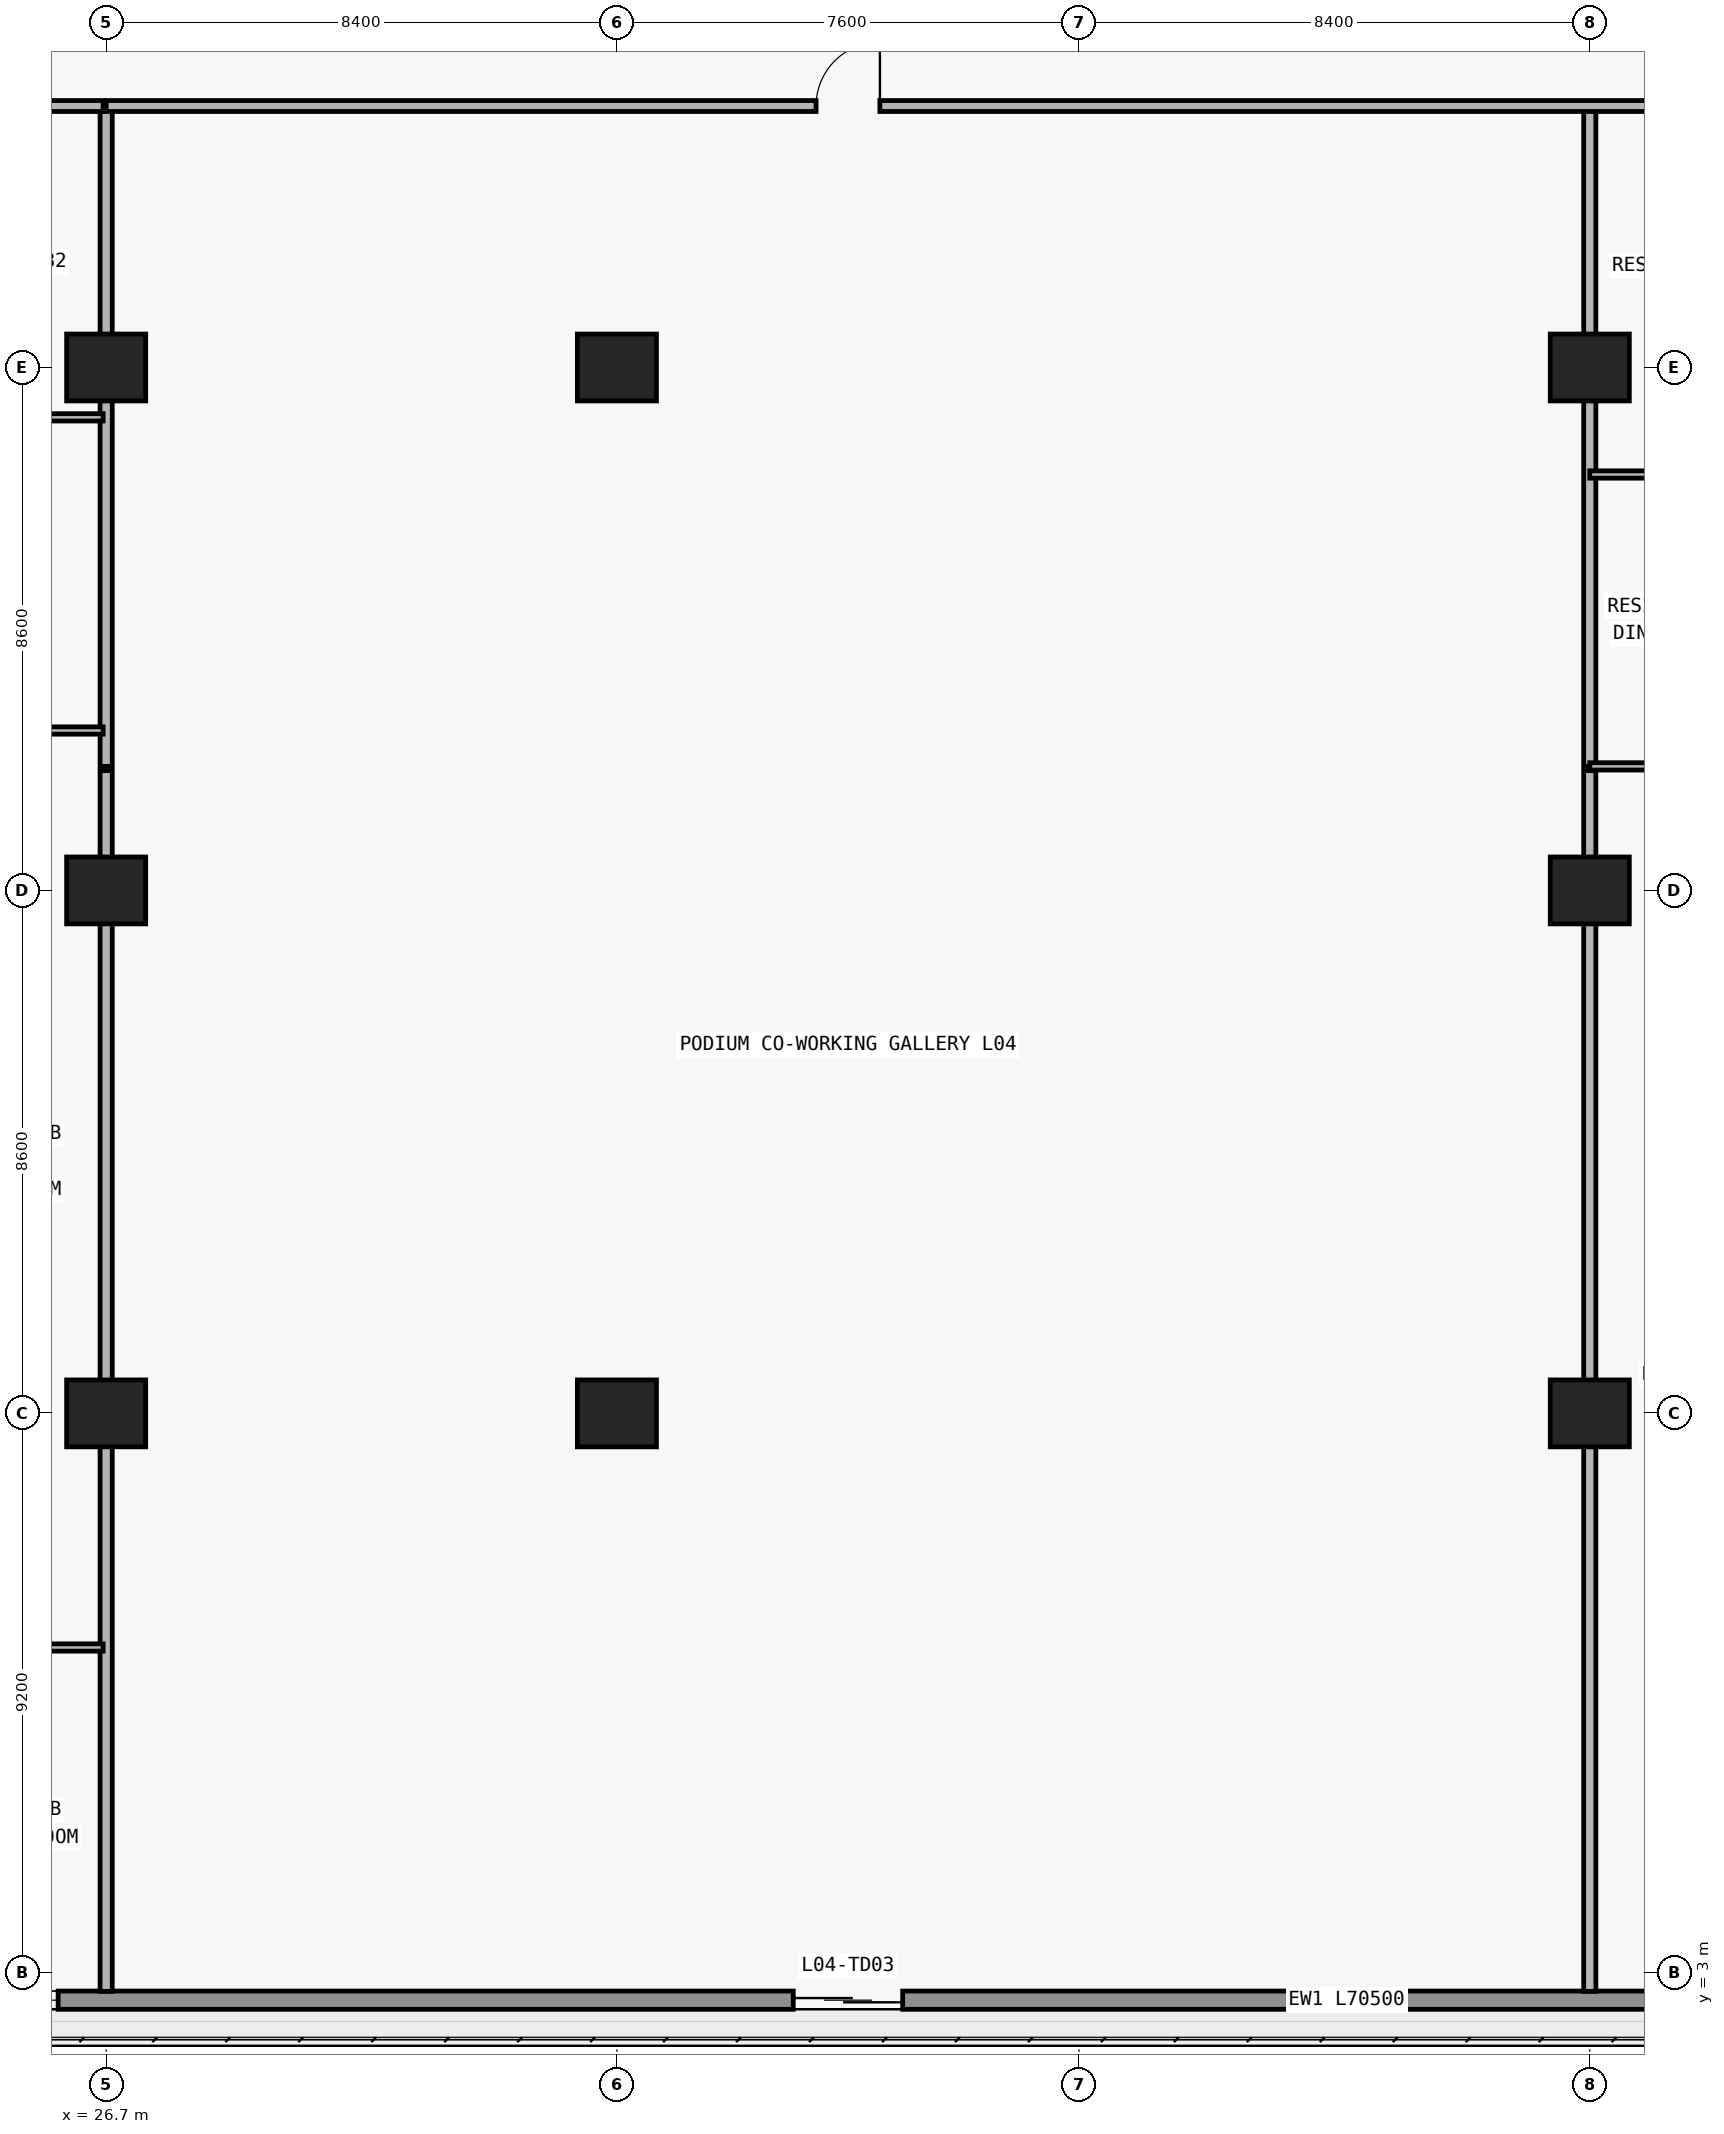
"""IFC4 building model, lengths in metres.
Left out: names, types, materials, properties, quantities, classifications, styles, units other than length and angle.
Written with IfcOpenShell. Run it as: python <this file> out.ifc"""

import sys

from ifc_helpers import new_model, si_unit, direction, frame, frame_2d, origin, origin_2d, place, context, subcontext, project, spatial, rectangle, extrude, element, fill, save


model = new_model("IFC4")
c1 = context("Model", 3, precision=1e-05, world=origin(), true_north=direction((0.0, 1.0)))
c2 = subcontext(c1, "Body", "Model", "MODEL_VIEW")
j1 = project(units=[si_unit("LENGTHUNIT", "METRE"), si_unit("PLANEANGLEUNIT", "RADIAN")], contexts=[c1])
p1 = place(None, origin())
s1 = spatial("IfcSite", under=j1, at=p1, CompositionType="ELEMENT")
p2 = place(p1, origin())
s2 = spatial("IfcBuilding", under=s1, at=p2, CompositionType="ELEMENT")
p3 = place(p2, frame((0.0, 0.0, 19.8)))
s3 = spatial("IfcBuildingStorey", under=s2, at=p3, CompositionType="ELEMENT", Elevation=19.8)
for number, where, z_axis, x_axis in (
    (1, (26.7, 12.2, 0.0), (0.0, 0.0, 1.0), (1.0, 0.0, 0.0)),
    (2, (35.1, 12.2, 0.0), (0.0, 0.0, 1.0), (1.0, 0.0, 0.0)),
    (3, (51.1, 12.2, 0.0), (0.0, 0.0, 1.0), (1.0, 0.0, 0.0)),
    (4, (26.7, 20.8, 0.0), (0.0, 0.0, 1.0), (1.0, 0.0, 0.0)),
    (5, (51.1, 20.8, 0.0), (0.0, 0.0, 1.0), (1.0, 0.0, 0.0)),
    (6, (26.7, 29.4, 0.0), (0.0, 0.0, 1.0), (1.0, 0.0, 0.0)),
    (7, (35.1, 29.4, 0.0), (0.0, 0.0, 1.0), (1.0, 0.0, 0.0)),
    (8, (51.1, 29.4, 0.0), (0.0, 0.0, 1.0), (1.0, 0.0, 0.0)),
):
    element("IfcColumn", number, at=place(p3, frame(where, z_axis=z_axis, x_axis=x_axis)), inside=s3, PredefinedType="COLUMN", context=c2, shape_type="SweptSolid", body=[
        extrude(rectangle(XDim=1.3, YDim=1.1, at=origin_2d()), origin(), (0.0, 0.0, 1.0), 4.45),
    ])
p4 = place(p3, frame((74.15, 2.55, 0.0), z_axis=(0.0, 0.0, 1.0), x_axis=(-1.0, 0.0, 0.0)))
e9 = element("IfcWall", 9, at=p4, inside=s3, PredefinedType="STANDARD", context=c2, shape_type="SweptSolid", body=[
    extrude(rectangle(XDim=70.5, YDim=0.3, at=frame_2d((35.25, 0.0))), origin(), (0.0, 0.0, 1.0), 4.45),
])
p5 = place(p4, frame((65.875, 0.0, 0.85)))
e10 = element("IfcOpeningElement", 10, at=p5, cuts=e9, PredefinedType="OPENING", context=c2, shape_type="SweptSolid", body=[
    extrude(rectangle(XDim=3.0, YDim=2.4, at=frame_2d((1.5, 1.2))), frame((0.0, 0.16, 0.0), z_axis=(0.0, -1.0, 0.0), x_axis=(1.0, 0.0, 0.0)), (0.0, 0.0, 1.0), 0.32),
])
p6 = place(p4, frame((61.376, 0.0, 0.0)))
e11 = element("IfcOpeningElement", 11, at=p6, cuts=e9, PredefinedType="OPENING", context=c2, shape_type="SweptSolid", body=[
    extrude(rectangle(XDim=1.8, YDim=2.3, at=frame_2d((0.9, 1.15))), frame((0.0, 0.16, 0.0), z_axis=(0.0, -1.0, 0.0), x_axis=(1.0, 0.0, 0.0)), (0.0, 0.0, 1.0), 0.32),
])
p7 = place(p4, frame((56.976, 0.0, 0.85)))
e12 = element("IfcOpeningElement", 12, at=p7, cuts=e9, PredefinedType="OPENING", context=c2, shape_type="SweptSolid", body=[
    extrude(rectangle(XDim=2.2, YDim=1.55, at=frame_2d((1.1, 0.775))), frame((0.0, 0.16, 0.0), z_axis=(0.0, -1.0, 0.0), x_axis=(1.0, 0.0, 0.0)), (0.0, 0.0, 1.0), 0.32),
])
p8 = place(p4, frame((52.64, 0.0, 0.0)))
e13 = element("IfcOpeningElement", 13, at=p8, cuts=e9, PredefinedType="OPENING", context=c2, shape_type="SweptSolid", body=[
    extrude(rectangle(XDim=1.8, YDim=2.3, at=frame_2d((0.9, 1.15))), frame((0.0, 0.16, 0.0), z_axis=(0.0, -1.0, 0.0), x_axis=(1.0, 0.0, 0.0)), (0.0, 0.0, 1.0), 0.32),
])
p9 = place(p4, frame((48.24, 0.0, 0.85)))
e14 = element("IfcOpeningElement", 14, at=p9, cuts=e9, PredefinedType="OPENING", context=c2, shape_type="SweptSolid", body=[
    extrude(rectangle(XDim=2.2, YDim=1.55, at=frame_2d((1.1, 0.775))), frame((0.0, 0.16, 0.0), z_axis=(0.0, -1.0, 0.0), x_axis=(1.0, 0.0, 0.0)), (0.0, 0.0, 1.0), 0.32),
])
p10 = place(p4, frame((34.35, 0.0, 0.0)))
e15 = element("IfcOpeningElement", 15, at=p10, cuts=e9, PredefinedType="OPENING", context=c2, shape_type="SweptSolid", body=[
    extrude(rectangle(XDim=1.8, YDim=2.3, at=frame_2d((0.9, 1.15))), frame((0.0, 0.16, 0.0), z_axis=(0.0, -1.0, 0.0), x_axis=(1.0, 0.0, 0.0)), (0.0, 0.0, 1.0), 0.32),
])
p11 = place(p4, frame((17.95, 0.0, 0.0)))
e16 = element("IfcOpeningElement", 16, at=p11, cuts=e9, PredefinedType="OPENING", context=c2, shape_type="SweptSolid", body=[
    extrude(rectangle(XDim=1.8, YDim=2.3, at=frame_2d((0.9, 1.15))), frame((0.0, 0.16, 0.0), z_axis=(0.0, -1.0, 0.0), x_axis=(1.0, 0.0, 0.0)), (0.0, 0.0, 1.0), 0.32),
])
p12 = place(p4, frame((9.35, 0.0, 0.85)))
e17 = element("IfcOpeningElement", 17, at=p12, cuts=e9, PredefinedType="OPENING", context=c2, shape_type="SweptSolid", body=[
    extrude(rectangle(XDim=2.2, YDim=1.55, at=frame_2d((1.1, 0.775))), frame((0.0, 0.16, 0.0), z_axis=(0.0, -1.0, 0.0), x_axis=(1.0, 0.0, 0.0)), (0.0, 0.0, 1.0), 0.32),
])
p13 = place(p4, frame((1.625, 0.0, 0.85)))
e18 = element("IfcOpeningElement", 18, at=p13, cuts=e9, PredefinedType="OPENING", context=c2, shape_type="SweptSolid", body=[
    extrude(rectangle(XDim=3.0, YDim=2.4, at=frame_2d((1.5, 1.2))), frame((0.0, 0.16, 0.0), z_axis=(0.0, -1.0, 0.0), x_axis=(1.0, 0.0, 0.0)), (0.0, 0.0, 1.0), 0.32),
])
p14 = place(p3, frame((26.7, 2.695, 0.0), z_axis=(0.0, 0.0, 1.0), x_axis=(0.0, 1.0, 0.0)))
e19 = element("IfcWall", 19, at=p14, inside=s3, PredefinedType="PARTITIONING", context=c2, shape_type="SweptSolid", body=[
    extrude(rectangle(XDim=20.075, YDim=0.2, at=frame_2d((10.038, 0.0))), origin(), (0.0, 0.0, 1.0), 3.014),
])
p15 = place(p3, frame((26.7, 22.84, 0.0), z_axis=(0.0, 0.0, 1.0), x_axis=(0.0, 1.0, 0.0)))
e20 = element("IfcWall", 20, at=p15, inside=s3, PredefinedType="PARTITIONING", context=c2, shape_type="SweptSolid", body=[
    extrude(rectangle(XDim=10.86, YDim=0.2, at=frame_2d((5.43, 0.0))), origin(), (0.0, 0.0, 1.0), 3.414),
])
p16 = place(p3, frame((51.1, 2.695, 0.0), z_axis=(0.0, 0.0, 1.0), x_axis=(0.0, 1.0, 0.0)))
e21 = element("IfcWall", 21, at=p16, inside=s3, PredefinedType="PARTITIONING", context=c2, shape_type="SweptSolid", body=[
    extrude(rectangle(XDim=20.075, YDim=0.2, at=frame_2d((10.038, 0.0))), origin(), (0.0, 0.0, 1.0), 3.414),
])
p17 = place(p3, frame((51.1, 22.84, 0.0), z_axis=(0.0, 0.0, 1.0), x_axis=(0.0, 1.0, 0.0)))
e22 = element("IfcWall", 22, at=p17, inside=s3, PredefinedType="PARTITIONING", context=c2, shape_type="SweptSolid", body=[
    extrude(rectangle(XDim=10.86, YDim=0.2, at=frame_2d((5.43, 0.0))), origin(), (0.0, 0.0, 1.0), 3.414),
])
p18 = place(p3, frame((22.92, 8.35, 0.0), z_axis=(0.0, 0.0, 1.0), x_axis=(1.0, 0.0, 0.0)))
e23 = element("IfcWall", 23, at=p18, inside=s3, PredefinedType="PARTITIONING", context=c2, shape_type="SweptSolid", body=[
    extrude(rectangle(XDim=3.73, YDim=0.12, at=frame_2d((1.865, 0.0))), origin(), (0.0, 0.0, 1.0), 4.45),
])
p19 = place(p18, frame((1.415, 0.0, 0.0)))
e24 = element("IfcOpeningElement", 24, at=p19, cuts=e23, PredefinedType="OPENING", context=c2, shape_type="SweptSolid", body=[
    extrude(rectangle(XDim=0.9, YDim=2.15, at=frame_2d((0.45, 1.075))), frame((0.0, 0.07, 0.0), z_axis=(0.0, -1.0, 0.0), x_axis=(1.0, 0.0, 0.0)), (0.0, 0.0, 1.0), 0.14),
])
p20 = place(p3, frame((51.1, 22.84, 0.0), z_axis=(0.0, 0.0, 1.0), x_axis=(1.0, 0.0, 0.0)))
e25 = element("IfcWall", 25, at=p20, inside=s3, PredefinedType="PARTITIONING", context=c2, shape_type="SweptSolid", body=[
    extrude(rectangle(XDim=8.4, YDim=0.12, at=frame_2d((4.2, 0.0))), origin(), (0.0, 0.0, 1.0), 4.45),
])
p21 = place(p20, frame((1.44, 0.0, 0.0)))
e26 = element("IfcOpeningElement", 26, at=p21, cuts=e25, PredefinedType="OPENING", context=c2, shape_type="SweptSolid", body=[
    extrude(rectangle(XDim=0.9, YDim=2.15, at=frame_2d((0.45, 1.075))), frame((0.0, 0.07, 0.0), z_axis=(0.0, -1.0, 0.0), x_axis=(1.0, 0.0, 0.0)), (0.0, 0.0, 1.0), 0.14),
])
p22 = place(p3, frame((18.3, 23.43, 0.0), z_axis=(0.0, 0.0, 1.0), x_axis=(1.0, 0.0, 0.0)))
e27 = element("IfcWall", 27, at=p22, inside=s3, PredefinedType="PARTITIONING", context=c2, shape_type="SweptSolid", body=[
    extrude(rectangle(XDim=8.35, YDim=0.12, at=frame_2d((4.175, 0.0))), origin(), (0.0, 0.0, 1.0), 4.45),
])
p23 = place(p22, frame((1.818, 0.0, 0.0)))
e28 = element("IfcOpeningElement", 28, at=p23, cuts=e27, PredefinedType="OPENING", context=c2, shape_type="SweptSolid", body=[
    extrude(rectangle(XDim=0.9, YDim=2.15, at=frame_2d((0.45, 1.075))), frame((0.0, 0.07, 0.0), z_axis=(0.0, -1.0, 0.0), x_axis=(1.0, 0.0, 0.0)), (0.0, 0.0, 1.0), 0.14),
])
p24 = place(p22, frame((6.035, 0.0, 0.0)))
e29 = element("IfcOpeningElement", 29, at=p24, cuts=e27, PredefinedType="OPENING", context=c2, shape_type="SweptSolid", body=[
    extrude(rectangle(XDim=0.9, YDim=2.15, at=frame_2d((0.45, 1.075))), frame((0.0, 0.07, 0.0), z_axis=(0.0, -1.0, 0.0), x_axis=(1.0, 0.0, 0.0)), (0.0, 0.0, 1.0), 0.14),
])
p25 = place(p3, frame((51.1, 27.64, 0.0), z_axis=(0.0, 0.0, 1.0), x_axis=(1.0, 0.0, 0.0)))
e30 = element("IfcWall", 30, at=p25, inside=s3, PredefinedType="PARTITIONING", context=c2, shape_type="SweptSolid", body=[
    extrude(rectangle(XDim=8.395, YDim=0.12, at=frame_2d((4.198, 0.0))), origin(), (0.0, 0.0, 1.0), 4.45),
])
p26 = place(p25, frame((1.44, 0.0, 0.0)))
e31 = element("IfcOpeningElement", 31, at=p26, cuts=e30, PredefinedType="OPENING", context=c2, shape_type="SweptSolid", body=[
    extrude(rectangle(XDim=0.9, YDim=2.15, at=frame_2d((0.45, 1.075))), frame((0.0, 0.07, 0.0), z_axis=(0.0, -1.0, 0.0), x_axis=(1.0, 0.0, 0.0)), (0.0, 0.0, 1.0), 0.14),
])
p27 = place(p3, frame((18.3, 28.58, 0.0), z_axis=(0.0, 0.0, 1.0), x_axis=(1.0, 0.0, 0.0)))
e32 = element("IfcWall", 32, at=p27, inside=s3, PredefinedType="PARTITIONING", context=c2, shape_type="SweptSolid", body=[
    extrude(rectangle(XDim=8.35, YDim=0.12, at=frame_2d((4.175, 0.0))), origin(), (0.0, 0.0, 1.0), 4.45),
])
p28 = place(p27, frame((1.818, 0.0, 0.0)))
e33 = element("IfcOpeningElement", 33, at=p28, cuts=e32, PredefinedType="OPENING", context=c2, shape_type="SweptSolid", body=[
    extrude(rectangle(XDim=0.9, YDim=2.15, at=frame_2d((0.45, 1.075))), frame((0.0, 0.07, 0.0), z_axis=(0.0, -1.0, 0.0), x_axis=(1.0, 0.0, 0.0)), (0.0, 0.0, 1.0), 0.14),
])
p29 = place(p3, frame((3.65, 33.7, 0.0), z_axis=(0.0, 0.0, 1.0), x_axis=(1.0, 0.0, 0.0)))
e34 = element("IfcWall", 34, at=p29, inside=s3, PredefinedType="PARTITIONING", context=c2, shape_type="SweptSolid", body=[
    extrude(rectangle(XDim=23.0, YDim=0.18, at=frame_2d((11.5, 0.0))), origin(), (0.0, 0.0, 1.0), 4.45),
])
p30 = place(p29, frame((2.6, 0.0, 0.0)))
e35 = element("IfcOpeningElement", 35, at=p30, cuts=e34, PredefinedType="OPENING", context=c2, shape_type="SweptSolid", body=[
    extrude(rectangle(XDim=1.05, YDim=2.15, at=frame_2d((0.525, 1.075))), frame((0.0, 0.1, 0.0), z_axis=(0.0, -1.0, 0.0), x_axis=(1.0, 0.0, 0.0)), (0.0, 0.0, 1.0), 0.2),
])
p31 = place(p29, frame((9.059, 0.0, 0.0)))
e36 = element("IfcOpeningElement", 36, at=p31, cuts=e34, PredefinedType="OPENING", context=c2, shape_type="SweptSolid", body=[
    extrude(rectangle(XDim=1.0, YDim=2.2, at=frame_2d((0.5, 1.1))), frame((0.0, 0.1, 0.0), z_axis=(0.0, -1.0, 0.0), x_axis=(1.0, 0.0, 0.0)), (0.0, 0.0, 1.0), 0.2),
])
p32 = place(p29, frame((17.344, 0.0, 0.0)))
e37 = element("IfcOpeningElement", 37, at=p32, cuts=e34, PredefinedType="OPENING", context=c2, shape_type="SweptSolid", body=[
    extrude(rectangle(XDim=1.0, YDim=2.2, at=frame_2d((0.5, 1.1))), frame((0.0, 0.1, 0.0), z_axis=(0.0, -1.0, 0.0), x_axis=(1.0, 0.0, 0.0)), (0.0, 0.0, 1.0), 0.2),
])
p33 = place(p3, frame((26.7, 33.7, 0.0), z_axis=(0.0, 0.0, 1.0), x_axis=(1.0, 0.0, 0.0)))
e38 = element("IfcWall", 38, at=p33, inside=s3, PredefinedType="PARTITIONING", context=c2, shape_type="SweptSolid", body=[
    extrude(rectangle(XDim=47.45, YDim=0.18, at=frame_2d((23.725, 0.0))), origin(), (0.0, 0.0, 1.0), 4.45),
])
p34 = place(p33, frame((11.675, 0.0, 0.0)))
e39 = element("IfcOpeningElement", 39, at=p34, cuts=e38, PredefinedType="OPENING", context=c2, shape_type="SweptSolid", body=[
    extrude(rectangle(XDim=1.05, YDim=2.15, at=frame_2d((0.525, 1.075))), frame((0.0, 0.1, 0.0), z_axis=(0.0, -1.0, 0.0), x_axis=(1.0, 0.0, 0.0)), (0.0, 0.0, 1.0), 0.2),
])
p35 = place(p33, frame((27.25, 0.0, 0.0)))
e40 = element("IfcOpeningElement", 40, at=p35, cuts=e38, PredefinedType="OPENING", context=c2, shape_type="SweptSolid", body=[
    extrude(rectangle(XDim=1.0, YDim=2.2, at=frame_2d((0.5, 1.1))), frame((0.0, 0.1, 0.0), z_axis=(0.0, -1.0, 0.0), x_axis=(1.0, 0.0, 0.0)), (0.0, 0.0, 1.0), 0.2),
])
p36 = place(p33, frame((43.8, 0.0, 0.0)))
e41 = element("IfcOpeningElement", 41, at=p36, cuts=e38, PredefinedType="OPENING", context=c2, shape_type="SweptSolid", body=[
    extrude(rectangle(XDim=1.05, YDim=2.15, at=frame_2d((0.525, 1.075))), frame((0.0, 0.1, 0.0), z_axis=(0.0, -1.0, 0.0), x_axis=(1.0, 0.0, 0.0)), (0.0, 0.0, 1.0), 0.2),
])
p37 = place(p9, origin())
e42 = element("IfcWindow", 42, at=p37, inside=s3, PartitioningType="SINGLE_PANEL", PredefinedType="WINDOW", context=c2, shape_type="SweptSolid", body=[
    extrude(rectangle(XDim=2.2, YDim=1.55, at=frame_2d((1.1, 0.775))), frame((0.0, 0.03, 0.0), z_axis=(0.0, -1.0, 0.0), x_axis=(1.0, 0.0, 0.0)), (0.0, 0.0, 1.0), 0.06),
])
fill(e14, e42)
p38 = place(p10, origin())
e43 = element("IfcDoor", 43, at=p38, inside=s3, OperationType="DOUBLE_DOOR_SLIDING", PredefinedType="DOOR", context=c2, shape_type="SweptSolid", body=[
    extrude(rectangle(XDim=1.8, YDim=2.3, at=frame_2d((0.9, 1.15))), frame((0.0, 0.025, 0.0), z_axis=(0.0, -1.0, 0.0), x_axis=(1.0, 0.0, 0.0)), (0.0, 0.0, 1.0), 0.05),
])
fill(e15, e43)
p39 = place(p34, origin())
e44 = element("IfcDoor", 44, at=p39, inside=s3, OperationType="SINGLE_SWING_RIGHT", PredefinedType="DOOR", context=c2, shape_type="SweptSolid", body=[
    extrude(rectangle(XDim=1.05, YDim=2.15, at=frame_2d((0.525, 1.075))), frame((0.0, 0.025, 0.0), z_axis=(0.0, -1.0, 0.0), x_axis=(1.0, 0.0, 0.0)), (0.0, 0.0, 1.0), 0.05),
])
fill(e39, e44)
save(model, sys.argv[1])
